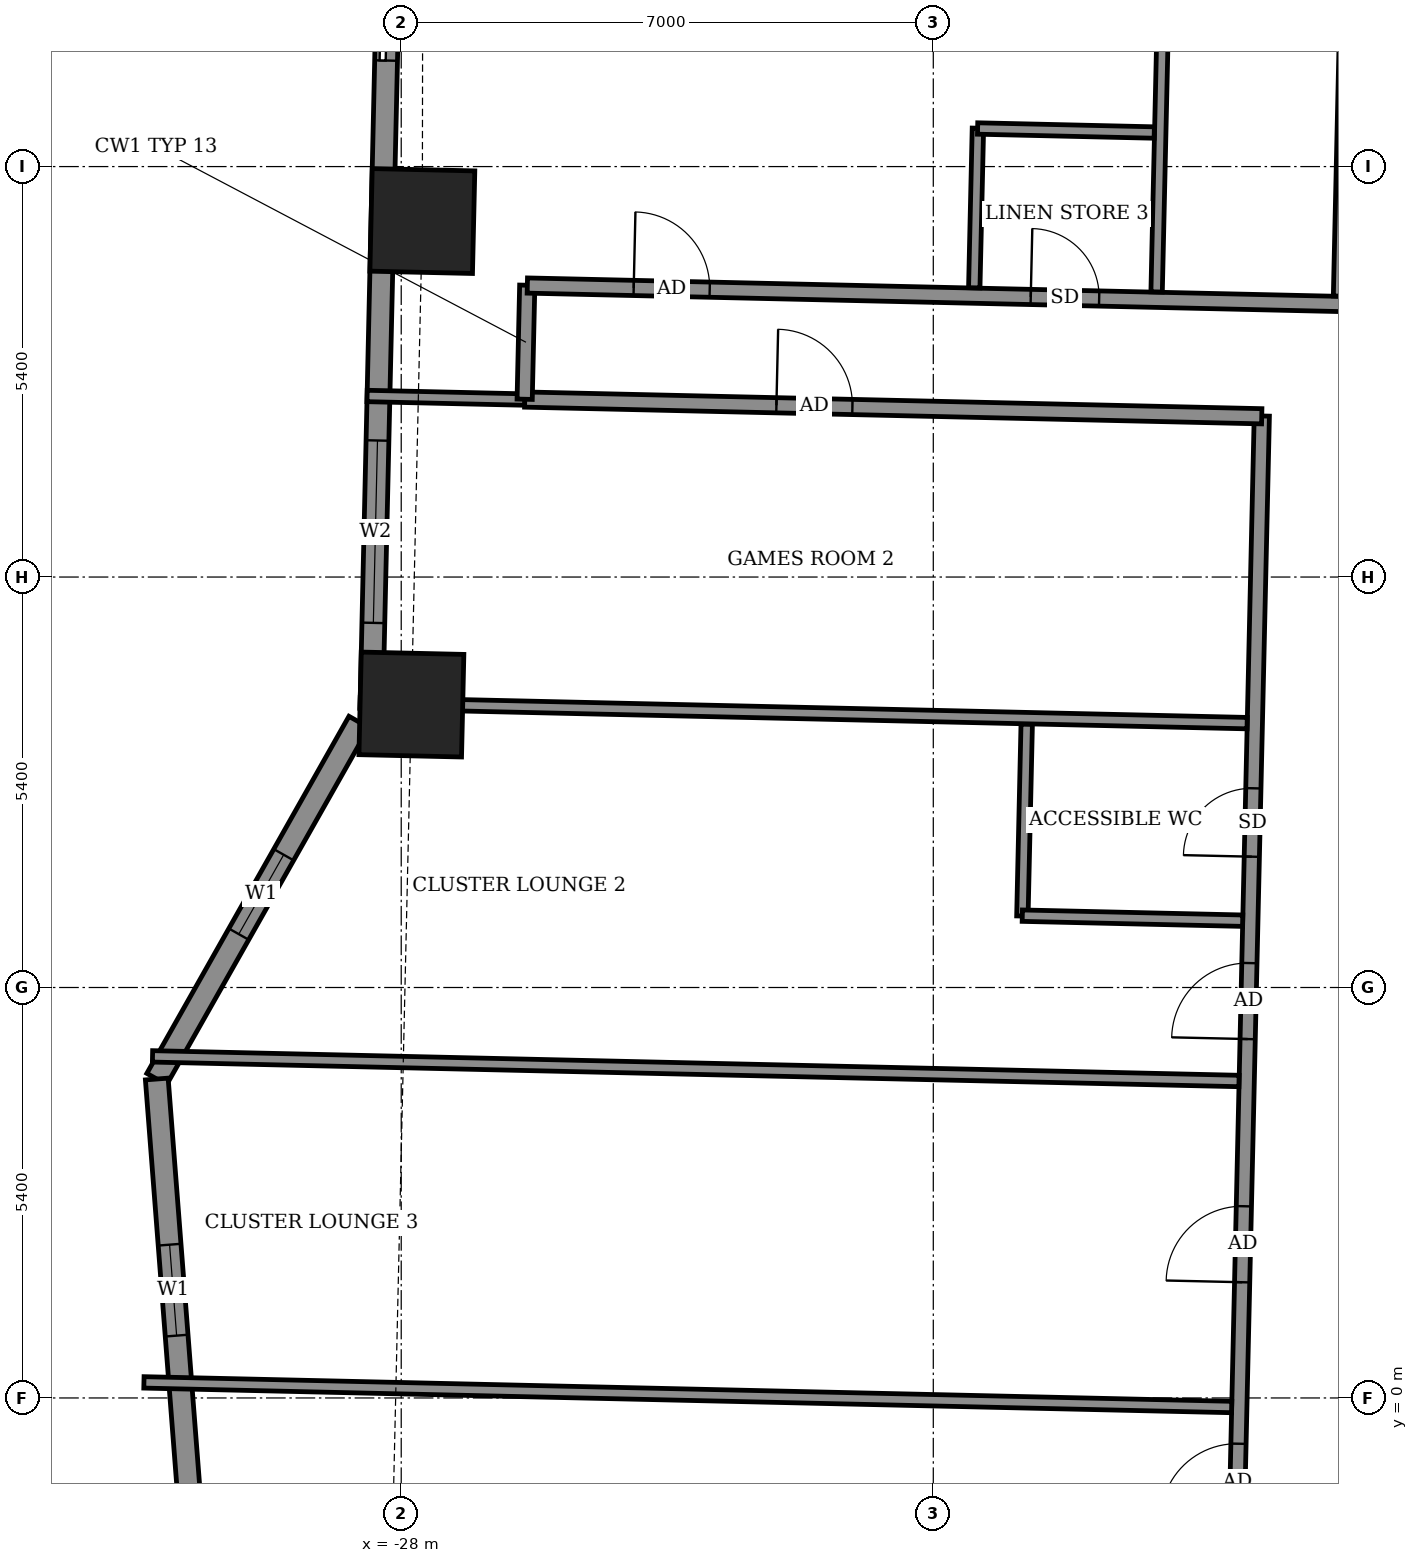
"""IFC4 building model, lengths in metres.
Left out: names, types, materials, properties, quantities, classifications, styles, units other than length and angle.
Written with IfcOpenShell. Run it as: python <this file> out.ifc"""

import sys

from ifc_helpers import new_model, si_unit, direction, frame, frame_2d, origin, origin_2d, place, context, subcontext, project, spatial, rectangle, extrude, element, fill, save


model = new_model("IFC4")
c1 = context("Model", 3, precision=1e-05, world=origin(), true_north=direction((0.0, 1.0)))
c2 = subcontext(c1, "Body", "Model", "MODEL_VIEW")
j1 = project(units=[si_unit("LENGTHUNIT", "METRE"), si_unit("PLANEANGLEUNIT", "RADIAN")], contexts=[c1])
p1 = place(None, origin())
s1 = spatial("IfcSite", under=j1, at=p1, CompositionType="ELEMENT")
p2 = place(p1, origin())
s2 = spatial("IfcBuilding", under=s1, at=p2, CompositionType="ELEMENT")
p3 = place(p2, frame((0.0, 0.0, 112.7)))
s3 = spatial("IfcBuildingStorey", under=s2, at=p3, CompositionType="ELEMENT", Elevation=112.7)
for number, where, z_axis, x_axis in (
    (1, (-27.722, 15.484, -0.55), (0.0, 0.0, 1.0), (-0.023, -1.0, 0.0)),
    (2, (-27.866, 9.123, -0.55), (0.0, 0.0, 1.0), (-0.023, -1.0, 0.0)),
):
    element("IfcColumn", number, at=place(p3, frame(where, z_axis=z_axis, x_axis=x_axis)), inside=s3, PredefinedType="COLUMN", context=c2, shape_type="SweptSolid", body=[
        extrude(rectangle(XDim=1.35, YDim=1.35, at=origin_2d()), origin(), (0.0, 0.0, 1.0), 3.6),
    ])
p4 = place(p3, frame((-28.106, 21.707, 0.0), z_axis=(0.0, 0.0, 1.0), x_axis=(-0.022654663697, -0.999743350172, 0.0)))
e3 = element("IfcWall", 3, at=p4, inside=s3, PredefinedType="SOLIDWALL", context=c2, shape_type="SweptSolid", body=[
    extrude(rectangle(XDim=12.63, YDim=0.3, at=frame_2d((6.315, 0.0))), origin(), (0.0, 0.0, 1.0), 3.05),
])
p5 = place(p4, frame((2.613, 0.0, 0.0)))
e4 = element("IfcOpeningElement", 4, at=p5, cuts=e3, PredefinedType="OPENING", context=c2, shape_type="SweptSolid", body=[
    extrude(rectangle(XDim=1.5, YDim=2.4, at=frame_2d((0.75, 1.2))), frame((0.0, 0.16, 0.0), z_axis=(0.0, -1.0, 0.0), x_axis=(1.0, 0.0, 0.0)), (0.0, 0.0, 1.0), 0.32),
])
p6 = place(p4, frame((9.113, 0.0, 0.9)))
e5 = element("IfcOpeningElement", 5, at=p6, cuts=e3, PredefinedType="OPENING", context=c2, shape_type="SweptSolid", body=[
    extrude(rectangle(XDim=2.4, YDim=1.5, at=frame_2d((1.2, 0.75))), frame((0.0, 0.16, 0.0), z_axis=(0.0, -1.0, 0.0), x_axis=(1.0, 0.0, 0.0)), (0.0, 0.0, 1.0), 0.32),
])
p7 = place(p3, frame((-28.557, 8.894, 0.0), z_axis=(0.0, 0.0, 1.0), x_axis=(-0.492589172415, -0.8702619762, 0.0)))
e6 = element("IfcWall", 6, at=p7, inside=s3, PredefinedType="SOLIDWALL", context=c2, shape_type="SweptSolid", body=[
    extrude(rectangle(XDim=5.398, YDim=0.3, at=frame_2d((2.699, 0.0))), origin(), (0.0, 0.0, 1.0), 3.05),
])
p8 = place(p7, frame((2.008, 0.0, 0.9)))
e7 = element("IfcOpeningElement", 7, at=p8, cuts=e6, PredefinedType="OPENING", context=c2, shape_type="SweptSolid", body=[
    extrude(rectangle(XDim=1.2, YDim=1.5, at=frame_2d((0.6, 0.75))), frame((0.0, 0.16, 0.0), z_axis=(0.0, -1.0, 0.0), x_axis=(1.0, 0.0, 0.0)), (0.0, 0.0, 1.0), 0.32),
])
p9 = place(p3, frame((-31.216, 4.196, 0.0), z_axis=(0.0, 0.0, 1.0), x_axis=(0.077178825362, -0.997017266107, 0.0)))
e8 = element("IfcWall", 8, at=p9, inside=s3, PredefinedType="SOLIDWALL", context=c2, shape_type="SweptSolid", body=[
    extrude(rectangle(XDim=5.574, YDim=0.3, at=frame_2d((2.787, 0.0))), origin(), (0.0, 0.0, 1.0), 3.05),
])
p10 = place(p9, frame((2.186, 0.0, 0.9)))
e9 = element("IfcOpeningElement", 9, at=p10, cuts=e8, PredefinedType="OPENING", context=c2, shape_type="SweptSolid", body=[
    extrude(rectangle(XDim=1.2, YDim=1.5, at=frame_2d((0.6, 0.75))), frame((0.0, 0.16, 0.0), z_axis=(0.0, -1.0, 0.0), x_axis=(1.0, 0.0, 0.0)), (0.0, 0.0, 1.0), 0.32),
])
p11 = place(p3, frame((-17.247, -12.149, 0.0), z_axis=(0.0, 0.0, 1.0), x_axis=(0.022696191528, 0.999742408268, 0.0)))
e10 = element("IfcWall", 10, at=p11, inside=s3, PredefinedType="PARTITIONING", context=c2, shape_type="SweptSolid", body=[
    extrude(rectangle(XDim=25.074, YDim=0.2, at=frame_2d((12.537, 0.0))), origin(), (0.0, 0.0, 1.0), 3.05),
])
p12 = place(p11, frame((16.875, 0.0, 0.0)))
e11 = element("IfcOpeningElement", 11, at=p12, cuts=e10, PredefinedType="OPENING", context=c2, shape_type="SweptSolid", body=[
    extrude(rectangle(XDim=1.0, YDim=2.1, at=frame_2d((0.5, 1.05))), frame((0.0, 0.11, 0.0), z_axis=(0.0, -1.0, 0.0), x_axis=(1.0, 0.0, 0.0)), (0.0, 0.0, 1.0), 0.22),
])
p13 = place(p11, frame((19.275, 0.0, 0.0)))
e12 = element("IfcOpeningElement", 12, at=p13, cuts=e10, PredefinedType="OPENING", context=c2, shape_type="SweptSolid", body=[
    extrude(rectangle(XDim=0.9, YDim=2.1, at=frame_2d((0.45, 1.05))), frame((0.0, 0.11, 0.0), z_axis=(0.0, -1.0, 0.0), x_axis=(1.0, 0.0, 0.0)), (0.0, 0.0, 1.0), 0.22),
])
p14 = place(p11, frame((13.675, 0.0, 0.0)))
e13 = element("IfcOpeningElement", 13, at=p14, cuts=e10, PredefinedType="OPENING", context=c2, shape_type="SweptSolid", body=[
    extrude(rectangle(XDim=1.0, YDim=2.1, at=frame_2d((0.5, 1.05))), frame((0.0, 0.11, 0.0), z_axis=(0.0, -1.0, 0.0), x_axis=(1.0, 0.0, 0.0)), (0.0, 0.0, 1.0), 0.22),
])
p15 = place(p11, frame((10.55, 0.0, 0.0)))
e14 = element("IfcOpeningElement", 14, at=p15, cuts=e10, PredefinedType="OPENING", context=c2, shape_type="SweptSolid", body=[
    extrude(rectangle(XDim=1.0, YDim=2.1, at=frame_2d((0.5, 1.05))), frame((0.0, 0.11, 0.0), z_axis=(0.0, -1.0, 0.0), x_axis=(1.0, 0.0, 0.0)), (0.0, 0.0, 1.0), 0.22),
])
p16 = place(p11, frame((8.225, 0.0, 0.0)))
e15 = element("IfcOpeningElement", 15, at=p16, cuts=e10, PredefinedType="OPENING", context=c2, shape_type="SweptSolid", body=[
    extrude(rectangle(XDim=0.9, YDim=2.1, at=frame_2d((0.45, 1.05))), frame((0.0, 0.11, 0.0), z_axis=(0.0, -1.0, 0.0), x_axis=(1.0, 0.0, 0.0)), (0.0, 0.0, 1.0), 0.22),
])
p17 = place(p11, frame((4.337, 0.0, 0.0)))
e16 = element("IfcOpeningElement", 16, at=p17, cuts=e10, PredefinedType="OPENING", context=c2, shape_type="SweptSolid", body=[
    extrude(rectangle(XDim=1.0, YDim=2.1, at=frame_2d((0.5, 1.05))), frame((0.0, 0.11, 0.0), z_axis=(0.0, -1.0, 0.0), x_axis=(1.0, 0.0, 0.0)), (0.0, 0.0, 1.0), 0.22),
])
p18 = place(p11, frame((0.75, 0.0, 0.0)))
e17 = element("IfcOpeningElement", 17, at=p18, cuts=e10, PredefinedType="OPENING", context=c2, shape_type="SweptSolid", body=[
    extrude(rectangle(XDim=0.9, YDim=2.1, at=frame_2d((0.45, 1.05))), frame((0.0, 0.11, 0.0), z_axis=(0.0, -1.0, 0.0), x_axis=(1.0, 0.0, 0.0)), (0.0, 0.0, 1.0), 0.22),
])
p19 = place(p3, frame((-31.385, 0.205, 0.0), z_axis=(0.0, 0.0, 1.0), x_axis=(0.99974382177, -0.022633842623, 0.0)))
e18 = element("IfcWall", 18, at=p19, inside=s3, PredefinedType="PARTITIONING", context=c2, shape_type="SweptSolid", body=[
    extrude(rectangle(XDim=14.314, YDim=0.15, at=frame_2d((7.157, 0.0))), origin(), (0.0, 0.0, 1.0), 2.1),
])
p20 = place(p3, frame((-31.272, 4.494, 0.0), z_axis=(0.0, 0.0, 1.0), x_axis=(0.999743244098, -0.022659344212, 0.0)))
e19 = element("IfcWall", 19, at=p20, inside=s3, PredefinedType="PARTITIONING", context=c2, shape_type="SweptSolid", body=[
    extrude(rectangle(XDim=14.298, YDim=0.15, at=frame_2d((7.149, 0.0))), origin(), (0.0, 0.0, 1.0), 2.1),
])
p21 = place(p3, frame((-19.828, 6.34, 0.0), z_axis=(0.0, 0.0, 1.0), x_axis=(0.022532486354, 0.9997461113, 0.0)))
e20 = element("IfcWall", 20, at=p21, inside=s3, PredefinedType="PARTITIONING", context=c2, shape_type="SweptSolid", body=[
    extrude(rectangle(XDim=2.525, YDim=0.15, at=frame_2d((1.262, 0.0))), origin(), (0.0, 0.0, 1.0), 3.05),
])
p22 = place(p3, frame((-19.829, 6.345, 0.0), z_axis=(0.0, 0.0, 1.0), x_axis=(0.999741618182, -0.022730967319, 0.0)))
e21 = element("IfcWall", 21, at=p22, inside=s3, PredefinedType="PARTITIONING", context=c2, shape_type="SweptSolid", body=[
    extrude(rectangle(XDim=2.9, YDim=0.15, at=frame_2d((1.45, 0.0))), origin(), (0.0, 0.0, 1.0), 3.05),
])
p23 = place(p3, frame((-28.541, 9.143, 0.0), z_axis=(0.0, 0.0, 1.0), x_axis=(0.999742008279, -0.022713803786, 0.0)))
e22 = element("IfcWall", 22, at=p23, inside=s3, PredefinedType="PARTITIONING", context=c2, shape_type="SweptSolid", body=[
    extrude(rectangle(XDim=11.673, YDim=0.15, at=frame_2d((5.836, 0.0))), origin(), (0.0, 0.0, 1.0), 3.05),
])
p24 = place(p3, frame((-28.449, 13.182, 0.0), z_axis=(0.0, 0.0, 1.0), x_axis=(0.999745641909, -0.022553303166, 0.0)))
e23 = element("IfcWall", 23, at=p24, inside=s3, PredefinedType="PARTITIONING", context=c2, shape_type="SweptSolid", body=[
    extrude(rectangle(XDim=2.078, YDim=0.15, at=frame_2d((1.039, 0.0))), origin(), (0.0, 0.0, 1.0), 2.55),
])
p25 = place(p3, frame((-26.375, 13.135, 0.0), z_axis=(0.0, 0.0, 1.0), x_axis=(0.999742757425, -0.022680806356, 0.0)))
e24 = element("IfcWall", 24, at=p25, inside=s3, PredefinedType="PARTITIONING", context=c2, shape_type="SweptSolid", body=[
    extrude(rectangle(XDim=9.698, YDim=0.2, at=frame_2d((4.849, 0.0))), origin(), (0.0, 0.0, 1.0), 3.05),
])
p26 = place(p25, frame((3.312, 0.0, 0.0)))
e25 = element("IfcOpeningElement", 25, at=p26, cuts=e24, PredefinedType="OPENING", context=c2, shape_type="SweptSolid", body=[
    extrude(rectangle(XDim=1.0, YDim=2.1, at=frame_2d((0.5, 1.05))), frame((0.0, 0.11, 0.0), z_axis=(0.0, -1.0, 0.0), x_axis=(1.0, 0.0, 0.0)), (0.0, 0.0, 1.0), 0.22),
])
p27 = place(p3, frame((-26.376, 13.139, 0.0), z_axis=(0.0, 0.0, 1.0), x_axis=(0.022617910375, 0.999744182344, 0.0)))
e26 = element("IfcWall", 26, at=p27, inside=s3, PredefinedType="PARTITIONING", context=c2, shape_type="SweptSolid", body=[
    extrude(rectangle(XDim=1.5, YDim=0.2, at=frame_2d((0.75, 0.0))), origin(), (0.0, 0.0, 1.0), 3.05),
])
p28 = place(p3, frame((-26.341, 14.635, 0.0), z_axis=(0.0, 0.0, 1.0), x_axis=(0.999742553034, -0.02268981385, 0.0)))
e27 = element("IfcWall", 27, at=p28, inside=s3, PredefinedType="PARTITIONING", context=c2, shape_type="SweptSolid", body=[
    extrude(rectangle(XDim=50.733, YDim=0.2, at=frame_2d((25.366, 0.0))), origin(), (0.0, 0.0, 1.0), 3.05),
])
p29 = place(p28, frame((47.954, 0.0, 0.0)))
e28 = element("IfcOpeningElement", 28, at=p29, cuts=e27, PredefinedType="OPENING", context=c2, shape_type="SweptSolid", body=[
    extrude(rectangle(XDim=1.0, YDim=2.1, at=frame_2d((0.5, 1.05))), frame((0.0, 0.11, 0.0), z_axis=(0.0, -1.0, 0.0), x_axis=(1.0, 0.0, 0.0)), (0.0, 0.0, 1.0), 0.22),
])
p30 = place(p28, frame((43.125, 0.0, 0.0)))
e29 = element("IfcOpeningElement", 29, at=p30, cuts=e27, PredefinedType="OPENING", context=c2, shape_type="SweptSolid", body=[
    extrude(rectangle(XDim=0.9, YDim=2.1, at=frame_2d((0.45, 1.05))), frame((0.0, 0.11, 0.0), z_axis=(0.0, -1.0, 0.0), x_axis=(1.0, 0.0, 0.0)), (0.0, 0.0, 1.0), 0.22),
])
p31 = place(p28, frame((40.7, 0.0, 0.0)))
e30 = element("IfcOpeningElement", 30, at=p31, cuts=e27, PredefinedType="OPENING", context=c2, shape_type="SweptSolid", body=[
    extrude(rectangle(XDim=0.9, YDim=2.1, at=frame_2d((0.45, 1.05))), frame((0.0, 0.11, 0.0), z_axis=(0.0, -1.0, 0.0), x_axis=(1.0, 0.0, 0.0)), (0.0, 0.0, 1.0), 0.22),
])
p32 = place(p28, frame((33.425, 0.0, 0.0)))
e31 = element("IfcOpeningElement", 31, at=p32, cuts=e27, PredefinedType="OPENING", context=c2, shape_type="SweptSolid", body=[
    extrude(rectangle(XDim=0.9, YDim=2.1, at=frame_2d((0.45, 1.05))), frame((0.0, 0.11, 0.0), z_axis=(0.0, -1.0, 0.0), x_axis=(1.0, 0.0, 0.0)), (0.0, 0.0, 1.0), 0.22),
])
p33 = place(p28, frame((30.95, 0.0, 0.0)))
e32 = element("IfcOpeningElement", 32, at=p33, cuts=e27, PredefinedType="OPENING", context=c2, shape_type="SweptSolid", body=[
    extrude(rectangle(XDim=0.9, YDim=2.1, at=frame_2d((0.45, 1.05))), frame((0.0, 0.11, 0.0), z_axis=(0.0, -1.0, 0.0), x_axis=(1.0, 0.0, 0.0)), (0.0, 0.0, 1.0), 0.22),
])
p34 = place(p28, frame((23.675, 0.0, 0.0)))
e33 = element("IfcOpeningElement", 33, at=p34, cuts=e27, PredefinedType="OPENING", context=c2, shape_type="SweptSolid", body=[
    extrude(rectangle(XDim=0.9, YDim=2.1, at=frame_2d((0.45, 1.05))), frame((0.0, 0.11, 0.0), z_axis=(0.0, -1.0, 0.0), x_axis=(1.0, 0.0, 0.0)), (0.0, 0.0, 1.0), 0.22),
])
p35 = place(p28, frame((21.2, 0.0, 0.0)))
e34 = element("IfcOpeningElement", 34, at=p35, cuts=e27, PredefinedType="OPENING", context=c2, shape_type="SweptSolid", body=[
    extrude(rectangle(XDim=0.9, YDim=2.1, at=frame_2d((0.45, 1.05))), frame((0.0, 0.11, 0.0), z_axis=(0.0, -1.0, 0.0), x_axis=(1.0, 0.0, 0.0)), (0.0, 0.0, 1.0), 0.22),
])
p36 = place(p28, frame((13.95, 0.0, 0.0)))
e35 = element("IfcOpeningElement", 35, at=p36, cuts=e27, PredefinedType="OPENING", context=c2, shape_type="SweptSolid", body=[
    extrude(rectangle(XDim=0.9, YDim=2.1, at=frame_2d((0.45, 1.05))), frame((0.0, 0.11, 0.0), z_axis=(0.0, -1.0, 0.0), x_axis=(1.0, 0.0, 0.0)), (0.0, 0.0, 1.0), 0.22),
])
p37 = place(p28, frame((11.475, 0.0, 0.0)))
e36 = element("IfcOpeningElement", 36, at=p37, cuts=e27, PredefinedType="OPENING", context=c2, shape_type="SweptSolid", body=[
    extrude(rectangle(XDim=0.9, YDim=2.1, at=frame_2d((0.45, 1.05))), frame((0.0, 0.11, 0.0), z_axis=(0.0, -1.0, 0.0), x_axis=(1.0, 0.0, 0.0)), (0.0, 0.0, 1.0), 0.22),
])
p38 = place(p28, frame((1.4, 0.0, 0.0)))
e37 = element("IfcOpeningElement", 37, at=p38, cuts=e27, PredefinedType="OPENING", context=c2, shape_type="SweptSolid", body=[
    extrude(rectangle(XDim=1.0, YDim=2.1, at=frame_2d((0.5, 1.05))), frame((0.0, 0.11, 0.0), z_axis=(0.0, -1.0, 0.0), x_axis=(1.0, 0.0, 0.0)), (0.0, 0.0, 1.0), 0.22),
])
p39 = place(p28, frame((6.625, 0.0, 0.0)))
e38 = element("IfcOpeningElement", 38, at=p39, cuts=e27, PredefinedType="OPENING", context=c2, shape_type="SweptSolid", body=[
    extrude(rectangle(XDim=0.9, YDim=2.1, at=frame_2d((0.45, 1.05))), frame((0.0, 0.11, 0.0), z_axis=(0.0, -1.0, 0.0), x_axis=(1.0, 0.0, 0.0)), (0.0, 0.0, 1.0), 0.22),
])
p40 = place(p3, frame((-20.461, 14.605, 0.0), z_axis=(0.0, 0.0, 1.0), x_axis=(0.022779486249, 0.999740513837, 0.0)))
e39 = element("IfcWall", 39, at=p40, inside=s3, PredefinedType="PARTITIONING", context=c2, shape_type="SweptSolid", body=[
    extrude(rectangle(XDim=2.101, YDim=0.15, at=frame_2d((1.05, 0.0))), origin(), (0.0, 0.0, 1.0), 3.05),
])
p41 = place(p3, frame((-18.062, 14.551, 0.0), z_axis=(0.0, 0.0, 1.0), x_axis=(0.022770155219, 0.999740726404, 0.0)))
e40 = element("IfcWall", 40, at=p41, inside=s3, PredefinedType="PARTITIONING", context=c2, shape_type="SweptSolid", body=[
    extrude(rectangle(XDim=11.376, YDim=0.15, at=frame_2d((5.688, 0.0))), origin(), (0.0, 0.0, 1.0), 2.55),
])
p42 = place(p3, frame((-15.662, 14.496, 0.0), z_axis=(0.0, 0.0, 1.0), x_axis=(0.022698155442, 0.999742363682, 0.0)))
e41 = element("IfcWall", 41, at=p42, inside=s3, PredefinedType="PARTITIONING", context=c2, shape_type="SweptSolid", body=[
    extrude(rectangle(XDim=8.11, YDim=0.15, at=frame_2d((4.055, 0.0))), origin(), (0.0, 0.0, 1.0), 3.05),
])
p43 = place(p42, frame((3.605, 0.0, 0.0)))
e42 = element("IfcOpeningElement", 42, at=p43, cuts=e41, PredefinedType="OPENING", context=c2, shape_type="SweptSolid", body=[
    extrude(rectangle(XDim=0.8, YDim=2.1, at=frame_2d((0.4, 1.05))), frame((0.0, 0.085, 0.0), z_axis=(0.0, -1.0, 0.0), x_axis=(1.0, 0.0, 0.0)), (0.0, 0.0, 1.0), 0.17),
])
p44 = place(p3, frame((-20.417, 16.701, 0.0), z_axis=(0.0, 0.0, 1.0), x_axis=(0.999740260747, -0.02279059109, 0.0)))
e43 = element("IfcWall", 43, at=p44, inside=s3, PredefinedType="PARTITIONING", context=c2, shape_type="SweptSolid", body=[
    extrude(rectangle(XDim=2.324, YDim=0.15, at=frame_2d((1.162, 0.0))), origin(), (0.0, 0.0, 1.0), 3.05),
])
p45 = place(p5, origin())
e44 = element("IfcDoor", 44, at=p45, inside=s3, OperationType="SLIDING_TO_LEFT", PredefinedType="DOOR", context=c2, shape_type="SweptSolid", body=[
    extrude(rectangle(XDim=1.5, YDim=2.4, at=frame_2d((0.75, 1.2))), frame((0.0, 0.025, 0.0), z_axis=(0.0, -1.0, 0.0), x_axis=(1.0, 0.0, 0.0)), (0.0, 0.0, 1.0), 0.05),
])
fill(e4, e44)
p46 = place(p6, origin())
e45 = element("IfcWindow", 45, at=p46, inside=s3, PartitioningType="DOUBLE_PANEL_VERTICAL", PredefinedType="WINDOW", context=c2, shape_type="SweptSolid", body=[
    extrude(rectangle(XDim=2.4, YDim=1.5, at=frame_2d((1.2, 0.75))), frame((0.0, 0.03, 0.0), z_axis=(0.0, -1.0, 0.0), x_axis=(1.0, 0.0, 0.0)), (0.0, 0.0, 1.0), 0.06),
])
fill(e5, e45)
p47 = place(p8, origin())
e46 = element("IfcWindow", 46, at=p47, inside=s3, PartitioningType="SINGLE_PANEL", PredefinedType="WINDOW", context=c2, shape_type="SweptSolid", body=[
    extrude(rectangle(XDim=1.2, YDim=1.5, at=frame_2d((0.6, 0.75))), frame((0.0, 0.03, 0.0), z_axis=(0.0, -1.0, 0.0), x_axis=(1.0, 0.0, 0.0)), (0.0, 0.0, 1.0), 0.06),
])
fill(e7, e46)
p48 = place(p10, origin())
e47 = element("IfcWindow", 47, at=p48, inside=s3, PartitioningType="SINGLE_PANEL", PredefinedType="WINDOW", context=c2, shape_type="SweptSolid", body=[
    extrude(rectangle(XDim=1.2, YDim=1.5, at=frame_2d((0.6, 0.75))), frame((0.0, 0.03, 0.0), z_axis=(0.0, -1.0, 0.0), x_axis=(1.0, 0.0, 0.0)), (0.0, 0.0, 1.0), 0.06),
])
fill(e9, e47)
p49 = place(p38, origin())
e48 = element("IfcDoor", 48, at=p49, inside=s3, OperationType="SINGLE_SWING_RIGHT", PredefinedType="DOOR", context=c2, shape_type="SweptSolid", body=[
    extrude(rectangle(XDim=1.0, YDim=2.1, at=frame_2d((0.5, 1.05))), frame((0.0, 0.025, 0.0), z_axis=(0.0, -1.0, 0.0), x_axis=(1.0, 0.0, 0.0)), (0.0, 0.0, 1.0), 0.05),
])
fill(e37, e48)
p50 = place(p39, origin())
e49 = element("IfcDoor", 49, at=p50, inside=s3, OperationType="SINGLE_SWING_LEFT", PredefinedType="DOOR", context=c2, shape_type="SweptSolid", body=[
    extrude(rectangle(XDim=0.9, YDim=2.1, at=frame_2d((0.45, 1.05))), frame((0.0, 0.025, 0.0), z_axis=(0.0, -1.0, 0.0), x_axis=(1.0, 0.0, 0.0)), (0.0, 0.0, 1.0), 0.05),
])
fill(e38, e49)
p51 = place(p26, origin())
e50 = element("IfcDoor", 50, at=p51, inside=s3, OperationType="SINGLE_SWING_LEFT", PredefinedType="DOOR", context=c2, shape_type="SweptSolid", body=[
    extrude(rectangle(XDim=1.0, YDim=2.1, at=frame_2d((0.5, 1.05))), frame((0.0, 0.025, 0.0), z_axis=(0.0, -1.0, 0.0), x_axis=(1.0, 0.0, 0.0)), (0.0, 0.0, 1.0), 0.05),
])
fill(e25, e50)
p52 = place(p12, origin())
e51 = element("IfcDoor", 51, at=p52, inside=s3, OperationType="SINGLE_SWING_RIGHT", PredefinedType="DOOR", context=c2, shape_type="SweptSolid", body=[
    extrude(rectangle(XDim=1.0, YDim=2.1, at=frame_2d((0.5, 1.05))), frame((0.0, 0.025, 0.0), z_axis=(0.0, -1.0, 0.0), x_axis=(1.0, 0.0, 0.0)), (0.0, 0.0, 1.0), 0.05),
])
fill(e11, e51)
p53 = place(p13, origin())
e52 = element("IfcDoor", 52, at=p53, inside=s3, OperationType="SINGLE_SWING_RIGHT", PredefinedType="DOOR", context=c2, shape_type="SweptSolid", body=[
    extrude(rectangle(XDim=0.9, YDim=2.1, at=frame_2d((0.45, 1.05))), frame((0.0, 0.025, 0.0), z_axis=(0.0, -1.0, 0.0), x_axis=(1.0, 0.0, 0.0)), (0.0, 0.0, 1.0), 0.05),
])
fill(e12, e52)
p54 = place(p14, origin())
e53 = element("IfcDoor", 53, at=p54, inside=s3, OperationType="SINGLE_SWING_LEFT", PredefinedType="DOOR", context=c2, shape_type="SweptSolid", body=[
    extrude(rectangle(XDim=1.0, YDim=2.1, at=frame_2d((0.5, 1.05))), frame((0.0, 0.025, 0.0), z_axis=(0.0, -1.0, 0.0), x_axis=(1.0, 0.0, 0.0)), (0.0, 0.0, 1.0), 0.05),
])
fill(e13, e53)
p55 = place(p15, origin())
e54 = element("IfcDoor", 54, at=p55, inside=s3, OperationType="SINGLE_SWING_RIGHT", PredefinedType="DOOR", context=c2, shape_type="SweptSolid", body=[
    extrude(rectangle(XDim=1.0, YDim=2.1, at=frame_2d((0.5, 1.05))), frame((0.0, 0.025, 0.0), z_axis=(0.0, -1.0, 0.0), x_axis=(1.0, 0.0, 0.0)), (0.0, 0.0, 1.0), 0.05),
])
fill(e14, e54)
save(model, sys.argv[1])
